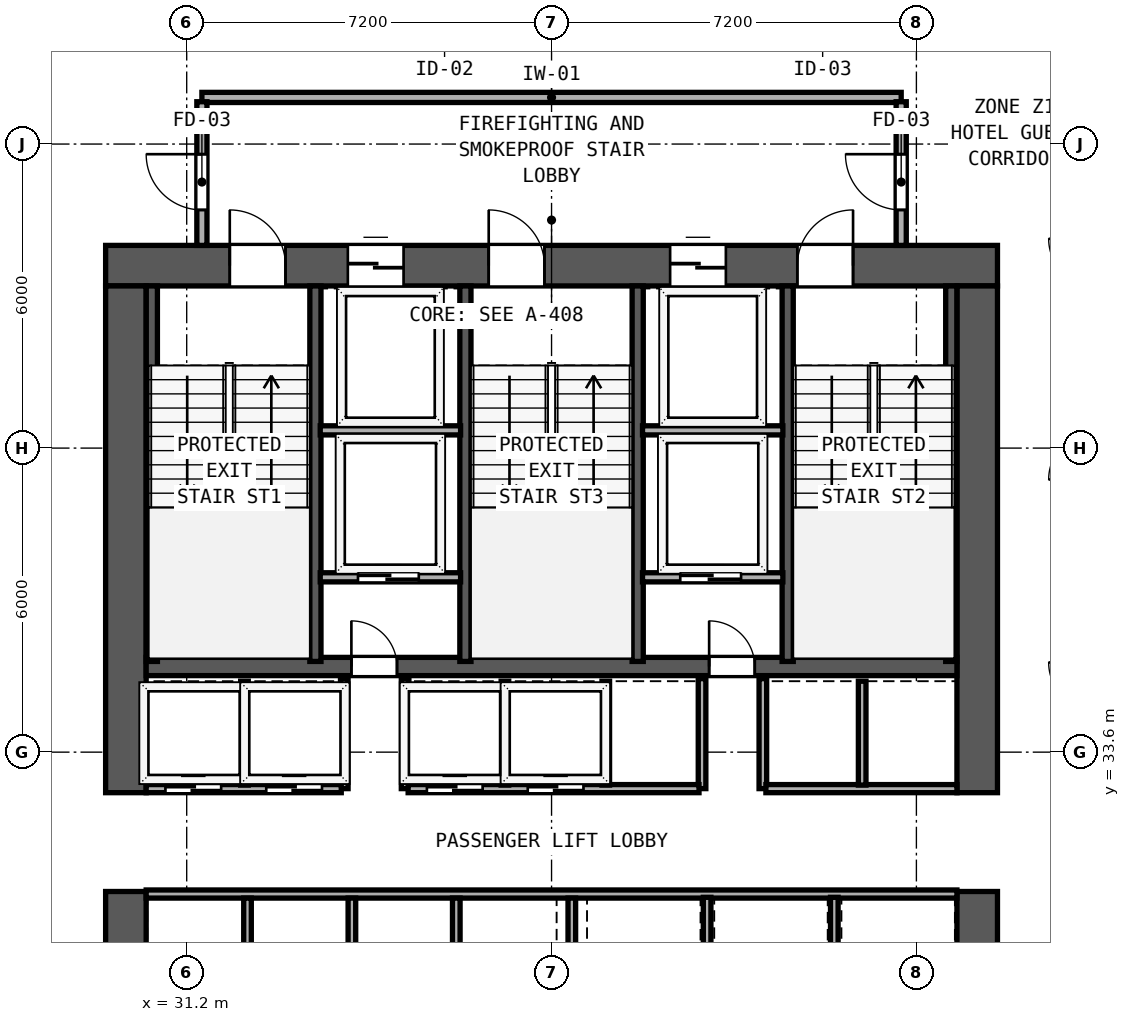
"""IFC4 building model, lengths in metres.
Left out: names, types, materials, properties, quantities, classifications, styles, units other than length and angle.
Written with IfcOpenShell. Run it as: python <this file> out.ifc"""

import sys

from ifc_helpers import new_model, si_unit, direction, frame, frame_2d, origin, place, context, subcontext, project, spatial, rectangle, extrude, element, fill, save


model = new_model("IFC4")
c1 = context("Model", 3, precision=1e-05, world=origin(), true_north=direction((0.0, 1.0)))
c2 = subcontext(c1, "Body", "Model", "MODEL_VIEW")
j1 = project(units=[si_unit("LENGTHUNIT", "METRE"), si_unit("PLANEANGLEUNIT", "RADIAN")], contexts=[c1])
p1 = place(None, origin())
s1 = spatial("IfcSite", under=j1, at=p1, CompositionType="ELEMENT")
p2 = place(p1, origin())
s2 = spatial("IfcBuilding", under=s1, at=p2, CompositionType="ELEMENT")
p3 = place(p2, frame((0.0, 0.0, 78.0)))
s3 = spatial("IfcBuildingStorey", under=s2, at=p3, CompositionType="ELEMENT", Elevation=78.0)
p4 = place(p3, frame((29.6, 43.2, 0.0), z_axis=(0.0, 0.0, 1.0), x_axis=(1.0, 0.0, 0.0)))
e1 = element("IfcWall", 1, at=p4, inside=s3, PredefinedType="SHEAR", context=c2, shape_type="SweptSolid", body=[
    extrude(rectangle(XDim=17.6, YDim=0.8, at=frame_2d((8.8, 0.0))), origin(), (0.0, 0.0, 1.0), 3.6),
])
p5 = place(p4, frame((2.45, 0.0, 0.0)))
e2 = element("IfcOpeningElement", 2, at=p5, cuts=e1, PredefinedType="OPENING", context=c2, shape_type="SweptSolid", body=[
    extrude(rectangle(XDim=1.1, YDim=2.15, at=frame_2d((0.55, 1.075))), frame((0.0, 0.41, 0.0), z_axis=(0.0, -1.0, 0.0), x_axis=(1.0, 0.0, 0.0)), (0.0, 0.0, 1.0), 0.82),
])
p6 = place(p4, frame((7.56, 0.0, 0.0)))
e3 = element("IfcOpeningElement", 3, at=p6, cuts=e1, PredefinedType="OPENING", context=c2, shape_type="SweptSolid", body=[
    extrude(rectangle(XDim=1.1, YDim=2.15, at=frame_2d((0.55, 1.075))), frame((0.0, 0.41, 0.0), z_axis=(0.0, -1.0, 0.0), x_axis=(1.0, 0.0, 0.0)), (0.0, 0.0, 1.0), 0.82),
])
p7 = place(p4, frame((13.65, 0.0, 0.0)))
e4 = element("IfcOpeningElement", 4, at=p7, cuts=e1, PredefinedType="OPENING", context=c2, shape_type="SweptSolid", body=[
    extrude(rectangle(XDim=1.1, YDim=2.15, at=frame_2d((0.55, 1.075))), frame((0.0, 0.41, 0.0), z_axis=(0.0, -1.0, 0.0), x_axis=(1.0, 0.0, 0.0)), (0.0, 0.0, 1.0), 0.82),
])
p8 = place(p4, frame((4.78, 0.0, 0.0)))
e5 = element("IfcOpeningElement", 5, at=p8, cuts=e1, PredefinedType="OPENING", context=c2, shape_type="SweptSolid", body=[
    extrude(rectangle(XDim=1.1, YDim=2.2, at=frame_2d((0.55, 1.1))), frame((0.0, 0.41, 0.0), z_axis=(0.0, -1.0, 0.0), x_axis=(1.0, 0.0, 0.0)), (0.0, 0.0, 1.0), 0.82),
])
p9 = place(p4, frame((11.14, 0.0, 0.0)))
e6 = element("IfcOpeningElement", 6, at=p9, cuts=e1, PredefinedType="OPENING", context=c2, shape_type="SweptSolid", body=[
    extrude(rectangle(XDim=1.1, YDim=2.2, at=frame_2d((0.55, 1.1))), frame((0.0, 0.41, 0.0), z_axis=(0.0, -1.0, 0.0), x_axis=(1.0, 0.0, 0.0)), (0.0, 0.0, 1.0), 0.82),
])
p10 = place(p3, frame((30.0, 26.8, 0.0), z_axis=(0.0, 0.0, 1.0), x_axis=(0.0, 1.0, 0.0)))
e7 = element("IfcWall", 7, at=p10, inside=s3, PredefinedType="SHEAR", context=c2, shape_type="SweptSolid", body=[
    extrude(rectangle(XDim=4.05, YDim=0.8, at=frame_2d((2.025, 0.0))), origin(), (0.0, 0.0, 1.0), 3.6),
])
p11 = place(p3, frame((30.0, 32.8, 0.0), z_axis=(0.0, 0.0, 1.0), x_axis=(0.0, 1.0, 0.0)))
e8 = element("IfcWall", 8, at=p11, inside=s3, PredefinedType="SHEAR", context=c2, shape_type="SweptSolid", body=[
    extrude(rectangle(XDim=10.0, YDim=0.8, at=frame_2d((5.0, 0.0))), origin(), (0.0, 0.0, 1.0), 3.6),
])
p12 = place(p3, frame((46.8, 26.8, 0.0), z_axis=(0.0, 0.0, 1.0), x_axis=(0.0, 1.0, 0.0)))
e9 = element("IfcWall", 9, at=p12, inside=s3, PredefinedType="SHEAR", context=c2, shape_type="SweptSolid", body=[
    extrude(rectangle(XDim=4.05, YDim=0.8, at=frame_2d((2.025, 0.0))), origin(), (0.0, 0.0, 1.0), 3.6),
])
p13 = place(p3, frame((46.8, 32.8, 0.0), z_axis=(0.0, 0.0, 1.0), x_axis=(0.0, 1.0, 0.0)))
e10 = element("IfcWall", 10, at=p13, inside=s3, PredefinedType="SHEAR", context=c2, shape_type="SweptSolid", body=[
    extrude(rectangle(XDim=10.0, YDim=0.8, at=frame_2d((5.0, 0.0))), origin(), (0.0, 0.0, 1.0), 3.6),
])
p14 = place(p3, frame((30.4, 35.29, 0.0), z_axis=(0.0, 0.0, 1.0), x_axis=(1.0, 0.0, 0.0)))
e11 = element("IfcWall", 11, at=p14, inside=s3, PredefinedType="SHEAR", context=c2, shape_type="SweptSolid", body=[
    extrude(rectangle(XDim=16.0, YDim=0.36, at=frame_2d((8.0, 0.0))), origin(), (0.0, 0.0, 1.0), 3.6),
])
p15 = place(p14, frame((4.95, 0.0, 0.0), z_axis=(0.0, 0.0, 1.0), x_axis=(-1.0, 0.0, 0.0)))
e12 = element("IfcOpeningElement", 12, at=p15, cuts=e11, PredefinedType="OPENING", context=c2, shape_type="SweptSolid", body=[
    extrude(rectangle(XDim=0.9, YDim=2.1, at=frame_2d((0.45, 1.05))), frame((0.0, 0.19, 0.0), z_axis=(0.0, -1.0, 0.0), x_axis=(1.0, 0.0, 0.0)), (0.0, 0.0, 1.0), 0.38),
])
p16 = place(p14, frame((12.01, 0.0, 0.0), z_axis=(0.0, 0.0, 1.0), x_axis=(-1.0, 0.0, 0.0)))
e13 = element("IfcOpeningElement", 13, at=p16, cuts=e11, PredefinedType="OPENING", context=c2, shape_type="SweptSolid", body=[
    extrude(rectangle(XDim=0.9, YDim=2.1, at=frame_2d((0.45, 1.05))), frame((0.0, 0.19, 0.0), z_axis=(0.0, -1.0, 0.0), x_axis=(1.0, 0.0, 0.0)), (0.0, 0.0, 1.0), 0.38),
])
for number, where, z_axis, x_axis in (
    (14, (30.512, 35.39, 0.0), (0.0, 0.0, 1.0), (0.0, 1.0, 0.0)),
    (15, (33.74, 35.39, 0.0), (0.0, 0.0, 1.0), (0.0, 1.0, 0.0)),
    (16, (36.7, 35.39, 0.0), (0.0, 0.0, 1.0), (0.0, 1.0, 0.0)),
    (17, (40.1, 35.39, 0.0), (0.0, 0.0, 1.0), (0.0, 1.0, 0.0)),
    (18, (43.06, 35.39, 0.0), (0.0, 0.0, 1.0), (0.0, 1.0, 0.0)),
    (19, (46.288, 35.39, 0.0), (0.0, 0.0, 1.0), (0.0, 1.0, 0.0)),
):
    element("IfcWall", number, at=place(p3, frame(where, z_axis=z_axis, x_axis=x_axis)), inside=s3, PredefinedType="SHEAR", context=c2, shape_type="SweptSolid", body=[
        extrude(rectangle(XDim=7.41, YDim=0.22, at=frame_2d((3.705, 0.0))), origin(), (0.0, 0.0, 1.0), 3.6),
    ])
p17 = place(p3, frame((31.5, 46.52, 0.0), z_axis=(0.0, 0.0, 1.0), x_axis=(1.0, 0.0, 0.0)))
e20 = element("IfcWall", 20, at=p17, inside=s3, PredefinedType="SOLIDWALL", context=c2, shape_type="SweptSolid", body=[
    extrude(rectangle(XDim=13.8, YDim=0.2, at=frame_2d((6.9, 0.0))), origin(), (0.0, 0.0, 1.0), 3.6),
])
p18 = place(p3, frame((31.5, 43.6, 0.0), z_axis=(0.0, 0.0, 1.0), x_axis=(0.0, 1.0, 0.0)))
e21 = element("IfcWall", 21, at=p18, inside=s3, PredefinedType="SOLIDWALL", context=c2, shape_type="SweptSolid", body=[
    extrude(rectangle(XDim=2.835, YDim=0.2, at=frame_2d((1.417, 0.0))), origin(), (0.0, 0.0, 1.0), 3.6),
])
p19 = place(p18, frame((1.8, 0.0, 0.0), z_axis=(0.0, 0.0, 1.0), x_axis=(-1.0, 0.0, 0.0)))
e22 = element("IfcOpeningElement", 22, at=p19, cuts=e21, PredefinedType="OPENING", context=c2, shape_type="SweptSolid", body=[
    extrude(rectangle(XDim=1.1, YDim=2.15, at=frame_2d((0.55, 1.075))), frame((0.0, 0.11, 0.0), z_axis=(0.0, -1.0, 0.0), x_axis=(1.0, 0.0, 0.0)), (0.0, 0.0, 1.0), 0.22),
])
p20 = place(p3, frame((45.3, 43.6, 0.0), z_axis=(0.0, 0.0, 1.0), x_axis=(0.0, 1.0, 0.0)))
e23 = element("IfcWall", 23, at=p20, inside=s3, PredefinedType="SOLIDWALL", context=c2, shape_type="SweptSolid", body=[
    extrude(rectangle(XDim=2.835, YDim=0.2, at=frame_2d((1.417, 0.0))), origin(), (0.0, 0.0, 1.0), 3.6),
])
p21 = place(p20, frame((0.7, 0.0, 0.0)))
e24 = element("IfcOpeningElement", 24, at=p21, cuts=e23, PredefinedType="OPENING", context=c2, shape_type="SweptSolid", body=[
    extrude(rectangle(XDim=1.1, YDim=2.15, at=frame_2d((0.55, 1.075))), frame((0.0, 0.11, 0.0), z_axis=(0.0, -1.0, 0.0), x_axis=(1.0, 0.0, 0.0)), (0.0, 0.0, 1.0), 0.22),
])
for number, where, z_axis, x_axis in (
    (25, (33.835, 39.95, 0.0), (0.0, 0.0, 1.0), (1.0, 0.0, 0.0)),
    (26, (40.195, 39.95, 0.0), (0.0, 0.0, 1.0), (1.0, 0.0, 0.0)),
):
    element("IfcWall", number, at=place(p3, frame(where, z_axis=z_axis, x_axis=x_axis)), inside=s3, PredefinedType="SOLIDWALL", context=c2, shape_type="SweptSolid", body=[
        extrude(rectangle(XDim=2.77, YDim=0.18, at=frame_2d((1.385, 0.0))), origin(), (0.0, 0.0, 1.0), 3.6),
    ])
p22 = place(p3, frame((33.835, 37.05, 0.0), z_axis=(0.0, 0.0, 1.0), x_axis=(1.0, 0.0, 0.0)))
e27 = element("IfcWall", 27, at=p22, inside=s3, PredefinedType="SOLIDWALL", context=c2, shape_type="SweptSolid", body=[
    extrude(rectangle(XDim=2.77, YDim=0.18, at=frame_2d((1.385, 0.0))), origin(), (0.0, 0.0, 1.0), 3.6),
])
p23 = place(p22, frame((1.945, 0.0, 0.0), z_axis=(0.0, 0.0, 1.0), x_axis=(-1.0, 0.0, 0.0)))
e28 = element("IfcOpeningElement", 28, at=p23, cuts=e27, PredefinedType="OPENING", context=c2, shape_type="SweptSolid", body=[
    extrude(rectangle(XDim=1.2, YDim=2.2, at=frame_2d((0.6, 1.1))), frame((0.0, 0.1, 0.0), z_axis=(0.0, -1.0, 0.0), x_axis=(1.0, 0.0, 0.0)), (0.0, 0.0, 1.0), 0.2),
])
for number, where, z_axis, x_axis in (
    (29, (34.31, 32.88, 0.0), (0.0, 0.0, 1.0), (0.0, 1.0, 0.0)),
    (30, (35.51, 32.88, 0.0), (0.0, 0.0, 1.0), (0.0, 1.0, 0.0)),
):
    element("IfcWall", number, at=place(p3, frame(where, z_axis=z_axis, x_axis=x_axis)), inside=s3, PredefinedType="SOLIDWALL", context=c2, shape_type="SweptSolid", body=[
        extrude(rectangle(XDim=2.17, YDim=0.15, at=frame_2d((1.085, 0.0))), origin(), (0.0, 0.0, 1.0), 3.6),
    ])
p24 = place(p3, frame((40.195, 37.05, 0.0), z_axis=(0.0, 0.0, 1.0), x_axis=(1.0, 0.0, 0.0)))
e31 = element("IfcWall", 31, at=p24, inside=s3, PredefinedType="SOLIDWALL", context=c2, shape_type="SweptSolid", body=[
    extrude(rectangle(XDim=2.77, YDim=0.18, at=frame_2d((1.385, 0.0))), origin(), (0.0, 0.0, 1.0), 3.6),
])
p25 = place(p24, frame((1.945, 0.0, 0.0), z_axis=(0.0, 0.0, 1.0), x_axis=(-1.0, 0.0, 0.0)))
e32 = element("IfcOpeningElement", 32, at=p25, cuts=e31, PredefinedType="OPENING", context=c2, shape_type="SweptSolid", body=[
    extrude(rectangle(XDim=1.2, YDim=2.2, at=frame_2d((0.6, 1.1))), frame((0.0, 0.1, 0.0), z_axis=(0.0, -1.0, 0.0), x_axis=(1.0, 0.0, 0.0)), (0.0, 0.0, 1.0), 0.2),
])
for number, where, z_axis, x_axis in (
    (33, (41.37, 32.88, 0.0), (0.0, 0.0, 1.0), (0.0, 1.0, 0.0)),
    (34, (42.57, 32.88, 0.0), (0.0, 0.0, 1.0), (0.0, 1.0, 0.0)),
):
    element("IfcWall", number, at=place(p3, frame(where, z_axis=z_axis, x_axis=x_axis)), inside=s3, PredefinedType="SOLIDWALL", context=c2, shape_type="SweptSolid", body=[
        extrude(rectangle(XDim=2.17, YDim=0.15, at=frame_2d((1.085, 0.0))), origin(), (0.0, 0.0, 1.0), 3.6),
    ])
p26 = place(p3, frame((30.4, 32.88, 0.0), z_axis=(0.0, 0.0, 1.0), x_axis=(1.0, 0.0, 0.0)))
e35 = element("IfcWall", 35, at=p26, inside=s3, PredefinedType="SOLIDWALL", context=c2, shape_type="SweptSolid", body=[
    extrude(rectangle(XDim=3.85, YDim=0.16, at=frame_2d((1.925, 0.0))), origin(), (0.0, 0.0, 1.0), 3.6),
])
p27 = place(p26, frame((1.48, 0.0, 0.0), z_axis=(0.0, 0.0, 1.0), x_axis=(-1.0, 0.0, 0.0)))
e36 = element("IfcOpeningElement", 36, at=p27, cuts=e35, PredefinedType="OPENING", context=c2, shape_type="SweptSolid", body=[
    extrude(rectangle(XDim=1.1, YDim=2.2, at=frame_2d((0.55, 1.1))), frame((0.0, 0.09, 0.0), z_axis=(0.0, -1.0, 0.0), x_axis=(1.0, 0.0, 0.0)), (0.0, 0.0, 1.0), 0.18),
])
p28 = place(p26, frame((3.47, 0.0, 0.0), z_axis=(0.0, 0.0, 1.0), x_axis=(-1.0, 0.0, 0.0)))
e37 = element("IfcOpeningElement", 37, at=p28, cuts=e35, PredefinedType="OPENING", context=c2, shape_type="SweptSolid", body=[
    extrude(rectangle(XDim=1.1, YDim=2.2, at=frame_2d((0.55, 1.1))), frame((0.0, 0.09, 0.0), z_axis=(0.0, -1.0, 0.0), x_axis=(1.0, 0.0, 0.0)), (0.0, 0.0, 1.0), 0.18),
])
p29 = place(p3, frame((35.57, 32.88, 0.0), z_axis=(0.0, 0.0, 1.0), x_axis=(1.0, 0.0, 0.0)))
e38 = element("IfcWall", 38, at=p29, inside=s3, PredefinedType="SOLIDWALL", context=c2, shape_type="SweptSolid", body=[
    extrude(rectangle(XDim=5.74, YDim=0.16, at=frame_2d((2.87, 0.0))), origin(), (0.0, 0.0, 1.0), 3.6),
])
p30 = place(p29, frame((1.47, 0.0, 0.0), z_axis=(0.0, 0.0, 1.0), x_axis=(-1.0, 0.0, 0.0)))
e39 = element("IfcOpeningElement", 39, at=p30, cuts=e38, PredefinedType="OPENING", context=c2, shape_type="SweptSolid", body=[
    extrude(rectangle(XDim=1.1, YDim=2.2, at=frame_2d((0.55, 1.1))), frame((0.0, 0.09, 0.0), z_axis=(0.0, -1.0, 0.0), x_axis=(1.0, 0.0, 0.0)), (0.0, 0.0, 1.0), 0.18),
])
p31 = place(p29, frame((3.46, 0.0, 0.0), z_axis=(0.0, 0.0, 1.0), x_axis=(-1.0, 0.0, 0.0)))
e40 = element("IfcOpeningElement", 40, at=p31, cuts=e38, PredefinedType="OPENING", context=c2, shape_type="SweptSolid", body=[
    extrude(rectangle(XDim=1.1, YDim=2.2, at=frame_2d((0.55, 1.1))), frame((0.0, 0.09, 0.0), z_axis=(0.0, -1.0, 0.0), x_axis=(1.0, 0.0, 0.0)), (0.0, 0.0, 1.0), 0.18),
])
p32 = place(p3, frame((42.63, 32.88, 0.0), z_axis=(0.0, 0.0, 1.0), x_axis=(1.0, 0.0, 0.0)))
e41 = element("IfcWall", 41, at=p32, inside=s3, PredefinedType="SOLIDWALL", context=c2, shape_type="SweptSolid", body=[
    extrude(rectangle(XDim=3.77, YDim=0.16, at=frame_2d((1.885, 0.0))), origin(), (0.0, 0.0, 1.0), 3.6),
])
for number, where, z_axis, x_axis in (
    (42, (32.34, 32.95, 0.0), (0.0, 0.0, 1.0), (0.0, 1.0, 0.0)),
    (43, (37.48, 32.95, 0.0), (0.0, 0.0, 1.0), (0.0, 1.0, 0.0)),
    (44, (39.47, 32.95, 0.0), (0.0, 0.0, 1.0), (0.0, 1.0, 0.0)),
    (45, (44.53, 32.95, 0.0), (0.0, 0.0, 1.0), (0.0, 1.0, 0.0)),
):
    element("IfcWall", number, at=place(p3, frame(where, z_axis=z_axis, x_axis=x_axis)), inside=s3, PredefinedType="SOLIDWALL", context=c2, shape_type="SweptSolid", body=[
        extrude(rectangle(XDim=2.05, YDim=0.15, at=frame_2d((1.025, 0.0))), origin(), (0.0, 0.0, 1.0), 3.6),
    ])
p33 = place(p3, frame((30.4, 30.8, 0.0), z_axis=(0.0, 0.0, 1.0), x_axis=(1.0, 0.0, 0.0)))
e46 = element("IfcWall", 46, at=p33, inside=s3, PredefinedType="SOLIDWALL", context=c2, shape_type="SweptSolid", body=[
    extrude(rectangle(XDim=16.0, YDim=0.16, at=frame_2d((8.0, 0.0))), origin(), (0.0, 0.0, 1.0), 3.6),
])
for number, where, z_axis, x_axis in (
    (47, (32.4, 28.735, 0.0), (0.0, 0.0, 1.0), (0.0, 1.0, 0.0)),
    (48, (34.46, 28.735, 0.0), (0.0, 0.0, 1.0), (0.0, 1.0, 0.0)),
    (49, (36.52, 28.735, 0.0), (0.0, 0.0, 1.0), (0.0, 1.0, 0.0)),
    (50, (38.8, 28.735, 0.0), (0.0, 0.0, 1.0), (0.0, 1.0, 0.0)),
):
    element("IfcWall", number, at=place(p3, frame(where, z_axis=z_axis, x_axis=x_axis)), inside=s3, PredefinedType="SOLIDWALL", context=c2, shape_type="SweptSolid", body=[
        extrude(rectangle(XDim=1.985, YDim=0.15, at=frame_2d((0.992, 0.0))), origin(), (0.0, 0.0, 1.0), 3.6),
    ])
for number, where, z_axis, x_axis in (
    (51, (41.47, 28.75, 0.0), (0.0, 0.0, 1.0), (0.0, 1.0, 0.0)),
    (52, (43.98, 28.75, 0.0), (0.0, 0.0, 1.0), (0.0, 1.0, 0.0)),
):
    element("IfcWall", number, at=place(p3, frame(where, z_axis=z_axis, x_axis=x_axis)), inside=s3, PredefinedType="SOLIDWALL", context=c2, shape_type="SweptSolid", body=[
        extrude(rectangle(XDim=1.985, YDim=0.15, at=frame_2d((0.993, 0.0))), origin(), (0.0, 0.0, 1.0), 3.6),
    ])
p34 = place(p5, origin())
e53 = element("IfcDoor", 53, at=p34, inside=s3, OperationType="SINGLE_SWING_LEFT", PredefinedType="DOOR", context=c2, shape_type="SweptSolid", body=[
    extrude(rectangle(XDim=1.1, YDim=2.15, at=frame_2d((0.55, 1.075))), frame((0.0, 0.185, 0.0), z_axis=(0.0, -1.0, 0.0), x_axis=(1.0, 0.0, 0.0)), (0.0, 0.0, 1.0), 0.05),
])
fill(e2, e53)
p35 = place(p6, origin())
e54 = element("IfcDoor", 54, at=p35, inside=s3, OperationType="SINGLE_SWING_LEFT", PredefinedType="DOOR", context=c2, shape_type="SweptSolid", body=[
    extrude(rectangle(XDim=1.1, YDim=2.15, at=frame_2d((0.55, 1.075))), frame((0.0, 0.185, 0.0), z_axis=(0.0, -1.0, 0.0), x_axis=(1.0, 0.0, 0.0)), (0.0, 0.0, 1.0), 0.05),
])
fill(e3, e54)
p36 = place(p7, origin())
e55 = element("IfcDoor", 55, at=p36, inside=s3, OperationType="SINGLE_SWING_RIGHT", PredefinedType="DOOR", context=c2, shape_type="SweptSolid", body=[
    extrude(rectangle(XDim=1.1, YDim=2.15, at=frame_2d((0.55, 1.075))), frame((0.0, 0.185, 0.0), z_axis=(0.0, -1.0, 0.0), x_axis=(1.0, 0.0, 0.0)), (0.0, 0.0, 1.0), 0.05),
])
fill(e4, e55)
p37 = place(p19, origin())
e56 = element("IfcDoor", 56, at=p37, inside=s3, OperationType="SINGLE_SWING_LEFT", PredefinedType="DOOR", context=c2, shape_type="SweptSolid", body=[
    extrude(rectangle(XDim=1.1, YDim=2.15, at=frame_2d((0.55, 1.075))), frame((0.0, 0.025, 0.0), z_axis=(0.0, -1.0, 0.0), x_axis=(1.0, 0.0, 0.0)), (0.0, 0.0, 1.0), 0.05),
])
fill(e22, e56)
p38 = place(p21, origin())
e57 = element("IfcDoor", 57, at=p38, inside=s3, OperationType="SINGLE_SWING_RIGHT", PredefinedType="DOOR", context=c2, shape_type="SweptSolid", body=[
    extrude(rectangle(XDim=1.1, YDim=2.15, at=frame_2d((0.55, 1.075))), frame((0.0, 0.025, 0.0), z_axis=(0.0, -1.0, 0.0), x_axis=(1.0, 0.0, 0.0)), (0.0, 0.0, 1.0), 0.05),
])
fill(e24, e57)
p39 = place(p8, origin())
e58 = element("IfcDoor", 58, at=p39, inside=s3, OperationType="SLIDING_TO_LEFT", PredefinedType="DOOR", context=c2, shape_type="SweptSolid", body=[
    extrude(rectangle(XDim=1.1, YDim=2.2, at=frame_2d((0.55, 1.1))), frame((0.0, 0.185, 0.0), z_axis=(0.0, -1.0, 0.0), x_axis=(1.0, 0.0, 0.0)), (0.0, 0.0, 1.0), 0.05),
])
fill(e5, e58)
p40 = place(p9, origin())
e59 = element("IfcDoor", 59, at=p40, inside=s3, OperationType="SLIDING_TO_LEFT", PredefinedType="DOOR", context=c2, shape_type="SweptSolid", body=[
    extrude(rectangle(XDim=1.1, YDim=2.2, at=frame_2d((0.55, 1.1))), frame((0.0, 0.185, 0.0), z_axis=(0.0, -1.0, 0.0), x_axis=(1.0, 0.0, 0.0)), (0.0, 0.0, 1.0), 0.05),
])
fill(e6, e59)
p41 = place(p23, origin())
e60 = element("IfcDoor", 60, at=p41, inside=s3, OperationType="SLIDING_TO_RIGHT", PredefinedType="DOOR", context=c2, shape_type="SweptSolid", body=[
    extrude(rectangle(XDim=1.2, YDim=2.2, at=frame_2d((0.6, 1.1))), frame((0.0, 0.025, 0.0), z_axis=(0.0, -1.0, 0.0), x_axis=(1.0, 0.0, 0.0)), (0.0, 0.0, 1.0), 0.05),
])
fill(e28, e60)
p42 = place(p15, origin())
e61 = element("IfcDoor", 61, at=p42, inside=s3, OperationType="SINGLE_SWING_RIGHT", PredefinedType="DOOR", context=c2, shape_type="SweptSolid", body=[
    extrude(rectangle(XDim=0.9, YDim=2.1, at=frame_2d((0.45, 1.05))), frame((0.0, 0.025, 0.0), z_axis=(0.0, -1.0, 0.0), x_axis=(1.0, 0.0, 0.0)), (0.0, 0.0, 1.0), 0.05),
])
fill(e12, e61)
p43 = place(p25, origin())
e62 = element("IfcDoor", 62, at=p43, inside=s3, OperationType="SLIDING_TO_RIGHT", PredefinedType="DOOR", context=c2, shape_type="SweptSolid", body=[
    extrude(rectangle(XDim=1.2, YDim=2.2, at=frame_2d((0.6, 1.1))), frame((0.0, 0.025, 0.0), z_axis=(0.0, -1.0, 0.0), x_axis=(1.0, 0.0, 0.0)), (0.0, 0.0, 1.0), 0.05),
])
fill(e32, e62)
p44 = place(p16, origin())
e63 = element("IfcDoor", 63, at=p44, inside=s3, OperationType="SINGLE_SWING_RIGHT", PredefinedType="DOOR", context=c2, shape_type="SweptSolid", body=[
    extrude(rectangle(XDim=0.9, YDim=2.1, at=frame_2d((0.45, 1.05))), frame((0.0, 0.025, 0.0), z_axis=(0.0, -1.0, 0.0), x_axis=(1.0, 0.0, 0.0)), (0.0, 0.0, 1.0), 0.05),
])
fill(e13, e63)
p45 = place(p27, origin())
e64 = element("IfcDoor", 64, at=p45, inside=s3, OperationType="SLIDING_TO_LEFT", PredefinedType="DOOR", context=c2, shape_type="SweptSolid", body=[
    extrude(rectangle(XDim=1.1, YDim=2.2, at=frame_2d((0.55, 1.1))), frame((0.0, 0.025, 0.0), z_axis=(0.0, -1.0, 0.0), x_axis=(1.0, 0.0, 0.0)), (0.0, 0.0, 1.0), 0.05),
])
fill(e36, e64)
p46 = place(p28, origin())
e65 = element("IfcDoor", 65, at=p46, inside=s3, OperationType="SLIDING_TO_LEFT", PredefinedType="DOOR", context=c2, shape_type="SweptSolid", body=[
    extrude(rectangle(XDim=1.1, YDim=2.2, at=frame_2d((0.55, 1.1))), frame((0.0, 0.025, 0.0), z_axis=(0.0, -1.0, 0.0), x_axis=(1.0, 0.0, 0.0)), (0.0, 0.0, 1.0), 0.05),
])
fill(e37, e65)
p47 = place(p30, origin())
e66 = element("IfcDoor", 66, at=p47, inside=s3, OperationType="SLIDING_TO_LEFT", PredefinedType="DOOR", context=c2, shape_type="SweptSolid", body=[
    extrude(rectangle(XDim=1.1, YDim=2.2, at=frame_2d((0.55, 1.1))), frame((0.0, 0.025, 0.0), z_axis=(0.0, -1.0, 0.0), x_axis=(1.0, 0.0, 0.0)), (0.0, 0.0, 1.0), 0.05),
])
fill(e39, e66)
p48 = place(p31, origin())
e67 = element("IfcDoor", 67, at=p48, inside=s3, OperationType="SLIDING_TO_LEFT", PredefinedType="DOOR", context=c2, shape_type="SweptSolid", body=[
    extrude(rectangle(XDim=1.1, YDim=2.2, at=frame_2d((0.55, 1.1))), frame((0.0, 0.025, 0.0), z_axis=(0.0, -1.0, 0.0), x_axis=(1.0, 0.0, 0.0)), (0.0, 0.0, 1.0), 0.05),
])
fill(e40, e67)
save(model, sys.argv[1])
